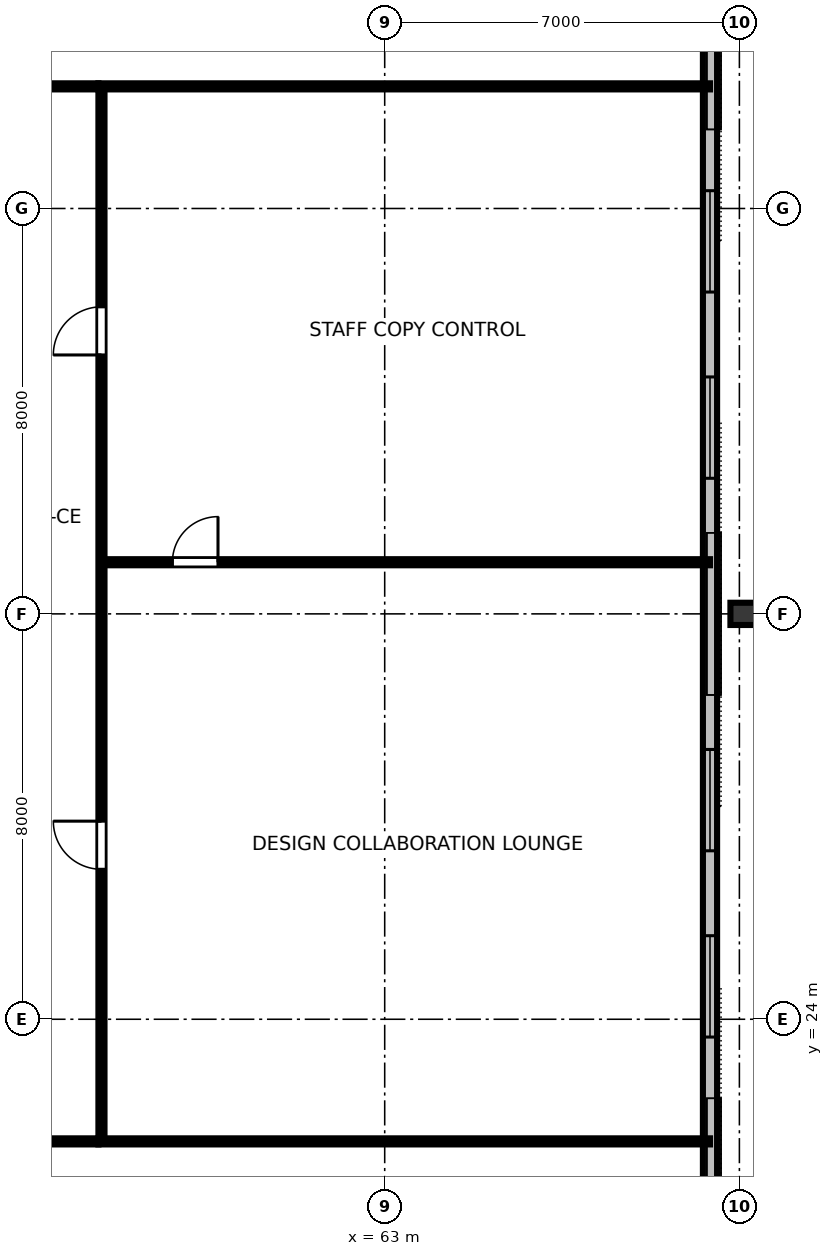
"""IFC4 building model, lengths in metres.
Left out: names, types, materials, properties, quantities, classifications, styles, units other than length and angle.
Written with IfcOpenShell. Run it as: python <this file> out.ifc"""

import sys

from ifc_helpers import new_model, si_unit, direction, frame, frame_2d, origin, origin_2d, place, context, subcontext, project, spatial, rectangle, i_section, extrude, element, fill, save


model = new_model("IFC4")
c1 = context("Model", 3, precision=1e-05, world=origin(), true_north=direction((0.0, 1.0)))
c2 = subcontext(c1, "Body", "Model", "MODEL_VIEW")
j1 = project(units=[si_unit("LENGTHUNIT", "METRE"), si_unit("PLANEANGLEUNIT", "RADIAN")], contexts=[c1])
p1 = place(None, origin())
s1 = spatial("IfcSite", under=j1, at=p1, CompositionType="ELEMENT")
p2 = place(p1, origin())
s2 = spatial("IfcBuilding", under=s1, at=p2, CompositionType="ELEMENT")
p3 = place(p2, frame((0.0, 0.0, 31.6)))
s3 = spatial("IfcBuildingStorey", under=s2, at=p3, CompositionType="ELEMENT", Elevation=31.6)
p4 = place(p3, frame((70.08, 32.0, 0.0), z_axis=(0.0, 0.0, 1.0), x_axis=(0.0, 1.0, 0.0)))
e1 = element("IfcColumn", 1, at=p4, inside=s3, PredefinedType="COLUMN", context=c2, shape_type="SweptSolid", body=[
    extrude(i_section(OverallWidth=0.439, OverallDepth=0.514, WebThickness=0.06, FlangeThickness=0.097, FilletRadius=0.025, at=origin_2d()), origin(), (0.0, 0.0, 1.0), 3.148),
])
p5 = place(p3, frame((69.42, 14.36, 0.0), z_axis=(0.0, 0.0, 1.0), x_axis=(0.0, 1.0, 0.0)))
e2 = element("IfcWall", 2, at=p5, inside=s3, PredefinedType="STANDARD", context=c2, shape_type="SweptSolid", body=[
    extrude(rectangle(XDim=35.28, YDim=0.28, at=frame_2d((17.64, 0.0))), origin(), (0.0, 0.0, 1.0), 3.15),
])
p6 = place(p5, frame((1.938, 0.0, 0.8)))
e3 = element("IfcOpeningElement", 3, at=p6, cuts=e2, PredefinedType="OPENING", context=c2, shape_type="SweptSolid", body=[
    extrude(rectangle(XDim=2.0, YDim=1.95, at=frame_2d((1.0, 0.975))), frame((0.0, 0.15, 0.0), z_axis=(0.0, -1.0, 0.0), x_axis=(1.0, 0.0, 0.0)), (0.0, 0.0, 1.0), 0.3),
])
p7 = place(p5, frame((9.289, 0.0, 0.8)))
e4 = element("IfcOpeningElement", 4, at=p7, cuts=e2, PredefinedType="OPENING", context=c2, shape_type="SweptSolid", body=[
    extrude(rectangle(XDim=2.0, YDim=1.95, at=frame_2d((1.0, 0.975))), frame((0.0, 0.15, 0.0), z_axis=(0.0, -1.0, 0.0), x_axis=(1.0, 0.0, 0.0)), (0.0, 0.0, 1.0), 0.3),
])
p8 = place(p5, frame((12.964, 0.0, 0.8)))
e5 = element("IfcOpeningElement", 5, at=p8, cuts=e2, PredefinedType="OPENING", context=c2, shape_type="SweptSolid", body=[
    extrude(rectangle(XDim=2.0, YDim=1.95, at=frame_2d((1.0, 0.975))), frame((0.0, 0.15, 0.0), z_axis=(0.0, -1.0, 0.0), x_axis=(1.0, 0.0, 0.0)), (0.0, 0.0, 1.0), 0.3),
])
p9 = place(p5, frame((20.316, 0.0, 0.8)))
e6 = element("IfcOpeningElement", 6, at=p9, cuts=e2, PredefinedType="OPENING", context=c2, shape_type="SweptSolid", body=[
    extrude(rectangle(XDim=2.0, YDim=1.95, at=frame_2d((1.0, 0.975))), frame((0.0, 0.15, 0.0), z_axis=(0.0, -1.0, 0.0), x_axis=(1.0, 0.0, 0.0)), (0.0, 0.0, 1.0), 0.3),
])
p10 = place(p5, frame((23.991, 0.0, 0.8)))
e7 = element("IfcOpeningElement", 7, at=p10, cuts=e2, PredefinedType="OPENING", context=c2, shape_type="SweptSolid", body=[
    extrude(rectangle(XDim=2.0, YDim=1.95, at=frame_2d((1.0, 0.975))), frame((0.0, 0.15, 0.0), z_axis=(0.0, -1.0, 0.0), x_axis=(1.0, 0.0, 0.0)), (0.0, 0.0, 1.0), 0.3),
])
p11 = place(p5, frame((31.342, 0.0, 0.8)))
e8 = element("IfcOpeningElement", 8, at=p11, cuts=e2, PredefinedType="OPENING", context=c2, shape_type="SweptSolid", body=[
    extrude(rectangle(XDim=2.0, YDim=1.95, at=frame_2d((1.0, 0.975))), frame((0.0, 0.15, 0.0), z_axis=(0.0, -1.0, 0.0), x_axis=(1.0, 0.0, 0.0)), (0.0, 0.0, 1.0), 0.3),
])
p12 = place(p3, frame((34.65, 21.59, 0.0), z_axis=(0.0, 0.0, 1.0), x_axis=(1.0, 0.0, 0.0)))
e9 = element("IfcWall", 9, at=p12, inside=s3, PredefinedType="PARTITIONING", context=c2, shape_type="SweptSolid", body=[
    extrude(rectangle(XDim=22.7, YDim=0.12, at=frame_2d((11.35, 0.0))), origin(), (0.0, 0.0, 1.0), 2.43),
])
p13 = place(p12, frame((2.224, 0.0, 0.0)))
e10 = element("IfcOpeningElement", 10, at=p13, cuts=e9, PredefinedType="OPENING", context=c2, shape_type="SweptSolid", body=[
    extrude(rectangle(XDim=0.95, YDim=2.15, at=frame_2d((0.475, 1.075))), frame((0.0, 0.07, 0.0), z_axis=(0.0, -1.0, 0.0), x_axis=(1.0, 0.0, 0.0)), (0.0, 0.0, 1.0), 0.14),
])
p14 = place(p12, frame((9.381, 0.0, 0.0)))
e11 = element("IfcOpeningElement", 11, at=p14, cuts=e9, PredefinedType="OPENING", context=c2, shape_type="SweptSolid", body=[
    extrude(rectangle(XDim=0.95, YDim=2.15, at=frame_2d((0.475, 1.075))), frame((0.0, 0.07, 0.0), z_axis=(0.0, -1.0, 0.0), x_axis=(1.0, 0.0, 0.0)), (0.0, 0.0, 1.0), 0.14),
])
p15 = place(p12, frame((18.031, 0.0, 0.0)))
e12 = element("IfcOpeningElement", 12, at=p15, cuts=e9, PredefinedType="OPENING", context=c2, shape_type="SweptSolid", body=[
    extrude(rectangle(XDim=0.95, YDim=2.15, at=frame_2d((0.475, 1.075))), frame((0.0, 0.07, 0.0), z_axis=(0.0, -1.0, 0.0), x_axis=(1.0, 0.0, 0.0)), (0.0, 0.0, 1.0), 0.14),
])
p16 = place(p3, frame((34.65, 42.41, 0.0), z_axis=(0.0, 0.0, 1.0), x_axis=(1.0, 0.0, 0.0)))
e13 = element("IfcWall", 13, at=p16, inside=s3, PredefinedType="PARTITIONING", context=c2, shape_type="SweptSolid", body=[
    extrude(rectangle(XDim=22.7, YDim=0.12, at=frame_2d((11.35, 0.0))), origin(), (0.0, 0.0, 1.0), 2.43),
])
p17 = place(p16, frame((3.981, 0.0, 0.0)))
e14 = element("IfcOpeningElement", 14, at=p17, cuts=e13, PredefinedType="OPENING", context=c2, shape_type="SweptSolid", body=[
    extrude(rectangle(XDim=0.95, YDim=2.15, at=frame_2d((0.475, 1.075))), frame((0.0, 0.07, 0.0), z_axis=(0.0, -1.0, 0.0), x_axis=(1.0, 0.0, 0.0)), (0.0, 0.0, 1.0), 0.14),
])
p18 = place(p16, frame((10.508, 0.0, 0.0)))
e15 = element("IfcOpeningElement", 15, at=p18, cuts=e13, PredefinedType="OPENING", context=c2, shape_type="SweptSolid", body=[
    extrude(rectangle(XDim=0.95, YDim=2.15, at=frame_2d((0.475, 1.075))), frame((0.0, 0.07, 0.0), z_axis=(0.0, -1.0, 0.0), x_axis=(1.0, 0.0, 0.0)), (0.0, 0.0, 1.0), 0.14),
])
p19 = place(p16, frame((17.402, 0.0, 0.0)))
e16 = element("IfcOpeningElement", 16, at=p19, cuts=e13, PredefinedType="OPENING", context=c2, shape_type="SweptSolid", body=[
    extrude(rectangle(XDim=0.95, YDim=2.15, at=frame_2d((0.475, 1.075))), frame((0.0, 0.07, 0.0), z_axis=(0.0, -1.0, 0.0), x_axis=(1.0, 0.0, 0.0)), (0.0, 0.0, 1.0), 0.14),
])
p20 = place(p3, frame((57.41, 33.019, 0.0), z_axis=(0.0, 0.0, 1.0), x_axis=(1.0, 0.0, 0.0)))
e17 = element("IfcWall", 17, at=p20, inside=s3, PredefinedType="PARTITIONING", context=c2, shape_type="SweptSolid", body=[
    extrude(rectangle(XDim=12.01, YDim=0.12, at=frame_2d((6.005, 0.0))), origin(), (0.0, 0.0, 1.0), 2.43),
])
p21 = place(p20, frame((1.4, 0.0, 0.0)))
e18 = element("IfcOpeningElement", 18, at=p21, cuts=e17, PredefinedType="OPENING", context=c2, shape_type="SweptSolid", body=[
    extrude(rectangle(XDim=0.9, YDim=2.15, at=frame_2d((0.45, 1.075))), frame((0.0, 0.07, 0.0), z_axis=(0.0, -1.0, 0.0), x_axis=(1.0, 0.0, 0.0)), (0.0, 0.0, 1.0), 0.14),
])
p22 = place(p3, frame((57.41, 21.65, 0.0), z_axis=(0.0, 0.0, 1.0), x_axis=(0.0, 1.0, 0.0)))
e19 = element("IfcWall", 19, at=p22, inside=s3, PredefinedType="PARTITIONING", context=c2, shape_type="SweptSolid", body=[
    extrude(rectangle(XDim=20.7, YDim=0.12, at=frame_2d((10.35, 0.0))), origin(), (0.0, 0.0, 1.0), 2.43),
])
p23 = place(p22, frame((5.31, 0.0, 0.0)))
e20 = element("IfcOpeningElement", 20, at=p23, cuts=e19, PredefinedType="OPENING", context=c2, shape_type="SweptSolid", body=[
    extrude(rectangle(XDim=0.95, YDim=2.15, at=frame_2d((0.475, 1.075))), frame((0.0, 0.07, 0.0), z_axis=(0.0, -1.0, 0.0), x_axis=(1.0, 0.0, 0.0)), (0.0, 0.0, 1.0), 0.14),
])
p24 = place(p22, frame((15.459, 0.0, 0.0)))
e21 = element("IfcOpeningElement", 21, at=p24, cuts=e19, PredefinedType="OPENING", context=c2, shape_type="SweptSolid", body=[
    extrude(rectangle(XDim=0.95, YDim=2.15, at=frame_2d((0.475, 1.075))), frame((0.0, 0.07, 0.0), z_axis=(0.0, -1.0, 0.0), x_axis=(1.0, 0.0, 0.0)), (0.0, 0.0, 1.0), 0.14),
])
for number, where, z_axis, x_axis in (
    (22, (57.35, 21.59, 0.0), (0.0, 0.0, 1.0), (1.0, 0.0, 0.0)),
    (23, (57.35, 42.41, 0.0), (0.0, 0.0, 1.0), (1.0, 0.0, 0.0)),
):
    element("IfcWall", number, at=place(p3, frame(where, z_axis=z_axis, x_axis=x_axis)), inside=s3, PredefinedType="PARTITIONING", context=c2, shape_type="SweptSolid", body=[
        extrude(rectangle(XDim=12.07, YDim=0.12, at=frame_2d((6.035, 0.0))), origin(), (0.0, 0.0, 1.0), 2.43),
    ])
p25 = place(p7, origin())
e24 = element("IfcWindow", 24, at=p25, inside=s3, PartitioningType="SINGLE_PANEL", PredefinedType="WINDOW", context=c2, shape_type="SweptSolid", body=[
    extrude(rectangle(XDim=2.0, YDim=1.95, at=frame_2d((1.0, 0.975))), frame((0.0, 0.03, 0.0), z_axis=(0.0, -1.0, 0.0), x_axis=(1.0, 0.0, 0.0)), (0.0, 0.0, 1.0), 0.06),
])
fill(e4, e24)
p26 = place(p8, origin())
e25 = element("IfcWindow", 25, at=p26, inside=s3, PartitioningType="SINGLE_PANEL", PredefinedType="WINDOW", context=c2, shape_type="SweptSolid", body=[
    extrude(rectangle(XDim=2.0, YDim=1.95, at=frame_2d((1.0, 0.975))), frame((0.0, 0.03, 0.0), z_axis=(0.0, -1.0, 0.0), x_axis=(1.0, 0.0, 0.0)), (0.0, 0.0, 1.0), 0.06),
])
fill(e5, e25)
p27 = place(p9, origin())
e26 = element("IfcWindow", 26, at=p27, inside=s3, PartitioningType="SINGLE_PANEL", PredefinedType="WINDOW", context=c2, shape_type="SweptSolid", body=[
    extrude(rectangle(XDim=2.0, YDim=1.95, at=frame_2d((1.0, 0.975))), frame((0.0, 0.03, 0.0), z_axis=(0.0, -1.0, 0.0), x_axis=(1.0, 0.0, 0.0)), (0.0, 0.0, 1.0), 0.06),
])
fill(e6, e26)
p28 = place(p10, origin())
e27 = element("IfcWindow", 27, at=p28, inside=s3, PartitioningType="SINGLE_PANEL", PredefinedType="WINDOW", context=c2, shape_type="SweptSolid", body=[
    extrude(rectangle(XDim=2.0, YDim=1.95, at=frame_2d((1.0, 0.975))), frame((0.0, 0.03, 0.0), z_axis=(0.0, -1.0, 0.0), x_axis=(1.0, 0.0, 0.0)), (0.0, 0.0, 1.0), 0.06),
])
fill(e7, e27)
p29 = place(p21, origin())
e28 = element("IfcDoor", 28, at=p29, inside=s3, OperationType="SINGLE_SWING_RIGHT", PredefinedType="DOOR", context=c2, shape_type="SweptSolid", body=[
    extrude(rectangle(XDim=0.9, YDim=2.15, at=frame_2d((0.45, 1.075))), frame((0.0, 0.025, 0.0), z_axis=(0.0, -1.0, 0.0), x_axis=(1.0, 0.0, 0.0)), (0.0, 0.0, 1.0), 0.05),
])
fill(e18, e28)
p30 = place(p23, origin())
e29 = element("IfcDoor", 29, at=p30, inside=s3, OperationType="SINGLE_SWING_RIGHT", PredefinedType="DOOR", context=c2, shape_type="SweptSolid", body=[
    extrude(rectangle(XDim=0.95, YDim=2.15, at=frame_2d((0.475, 1.075))), frame((0.0, 0.025, 0.0), z_axis=(0.0, -1.0, 0.0), x_axis=(1.0, 0.0, 0.0)), (0.0, 0.0, 1.0), 0.05),
])
fill(e20, e29)
p31 = place(p24, origin())
e30 = element("IfcDoor", 30, at=p31, inside=s3, OperationType="SINGLE_SWING_LEFT", PredefinedType="DOOR", context=c2, shape_type="SweptSolid", body=[
    extrude(rectangle(XDim=0.95, YDim=2.15, at=frame_2d((0.475, 1.075))), frame((0.0, 0.025, 0.0), z_axis=(0.0, -1.0, 0.0), x_axis=(1.0, 0.0, 0.0)), (0.0, 0.0, 1.0), 0.05),
])
fill(e21, e30)
save(model, sys.argv[1])
